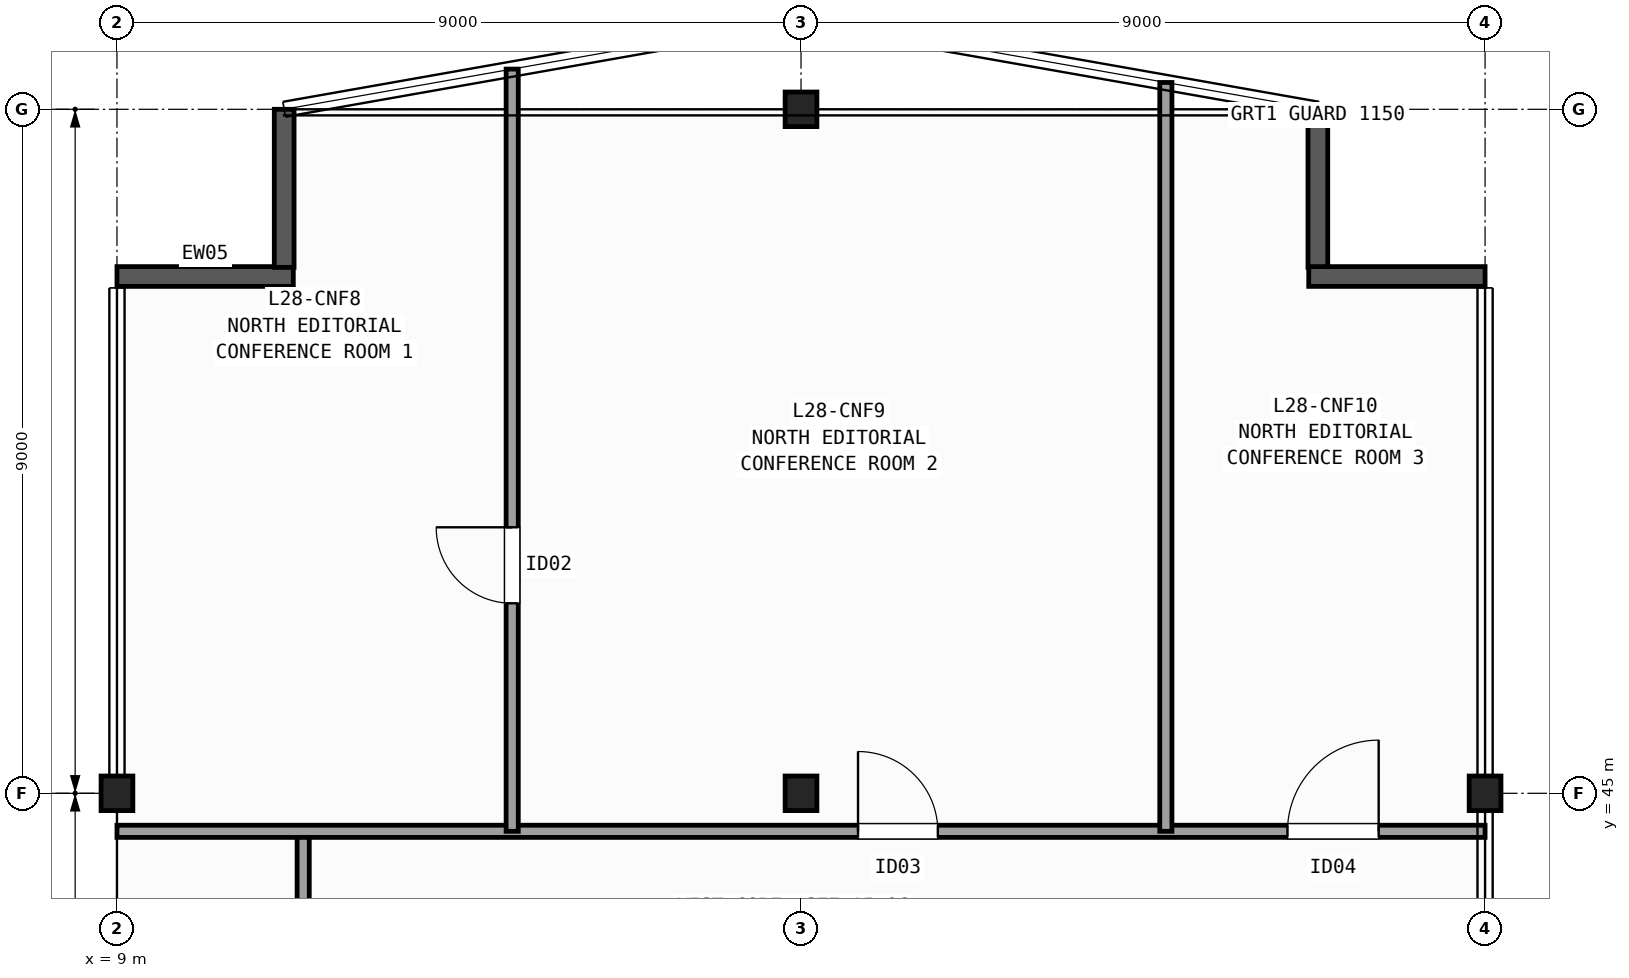
"""IFC4 building model, lengths in metres.
Left out: names, types, materials, properties, quantities, classifications, styles, units other than length and angle.
Written with IfcOpenShell. Run it as: python <this file> out.ifc"""

import sys

from ifc_helpers import new_model, si_unit, direction, frame, frame_2d, origin, origin_2d, place, context, subcontext, project, spatial, rectangle, i_section, extrude, element, fill, save


model = new_model("IFC4")
c1 = context("Model", 3, precision=1e-05, world=origin(), true_north=direction((0.0, 1.0)))
c2 = subcontext(c1, "Body", "Model", "MODEL_VIEW")
j1 = project(units=[si_unit("LENGTHUNIT", "METRE"), si_unit("PLANEANGLEUNIT", "RADIAN")], contexts=[c1])
p1 = place(None, origin())
s1 = spatial("IfcSite", under=j1, at=p1, CompositionType="ELEMENT")
p2 = place(p1, origin())
s2 = spatial("IfcBuilding", under=s1, at=p2, CompositionType="ELEMENT")
p3 = place(p2, frame((0.0, 0.0, 117.4)))
s3 = spatial("IfcBuildingStorey", under=s2, at=p3, CompositionType="ELEMENT", Elevation=117.4)
for number, where, z_axis, x_axis in (
    (1, (9.0, 45.0, 0.0), (0.0, 0.0, 1.0), (1.0, 0.0, 0.0)),
    (2, (18.0, 45.0, 0.0), (0.0, 0.0, 1.0), (1.0, 0.0, 0.0)),
    (3, (18.0, 54.0, 0.0), (0.0, 0.0, 1.0), (1.0, 0.0, 0.0)),
    (4, (27.0, 45.0, 0.0), (0.0, 0.0, 1.0), (1.0, 0.0, 0.0)),
):
    element("IfcColumn", number, at=place(p3, frame(where, z_axis=z_axis, x_axis=x_axis)), inside=s3, PredefinedType="COLUMN", context=c2, shape_type="SweptSolid", body=[
        extrude(i_section(OverallWidth=0.418, OverallDepth=0.455, WebThickness=0.042, FlangeThickness=0.068, FilletRadius=0.015, at=origin_2d()), origin(), (0.0, 0.0, 1.0), 3.7),
    ])
p4 = place(p3, frame((9.0, 51.8, 0.0), z_axis=(0.0, 0.0, 1.0), x_axis=(1.0, 0.0, 0.0)))
e5 = element("IfcWall", 5, at=p4, inside=s3, PredefinedType="SOLIDWALL", context=c2, shape_type="SweptSolid", body=[
    extrude(rectangle(XDim=2.32, YDim=0.26, at=frame_2d((1.16, 0.0))), origin(), (0.0, 0.0, 1.0), 3.42),
])
for number, where, z_axis, x_axis in (
    (6, (11.2, 51.92, 0.0), (0.0, 0.0, 1.0), (0.0, 1.0, 0.0)),
    (7, (24.8, 54.0, 0.0), (0.0, 0.0, 1.0), (0.0, -1.0, 0.0)),
):
    element("IfcWall", number, at=place(p3, frame(where, z_axis=z_axis, x_axis=x_axis)), inside=s3, PredefinedType="SOLIDWALL", context=c2, shape_type="SweptSolid", body=[
        extrude(rectangle(XDim=2.08, YDim=0.26, at=frame_2d((1.04, 0.0))), origin(), (0.0, 0.0, 1.0), 3.42),
    ])
p5 = place(p3, frame((24.68, 51.8, 0.0), z_axis=(0.0, 0.0, 1.0), x_axis=(1.0, 0.0, 0.0)))
e8 = element("IfcWall", 8, at=p5, inside=s3, PredefinedType="SOLIDWALL", context=c2, shape_type="SweptSolid", body=[
    extrude(rectangle(XDim=2.32, YDim=0.26, at=frame_2d((1.16, 0.0))), origin(), (0.0, 0.0, 1.0), 3.42),
])
p6 = place(p3, frame((11.45, 42.4, 0.0), z_axis=(0.0, 0.0, 1.0), x_axis=(0.0, 1.0, 0.0)))
e9 = element("IfcWall", 9, at=p6, inside=s3, PredefinedType="PARTITIONING", context=c2, shape_type="SweptSolid", body=[
    extrude(rectangle(XDim=2.1, YDim=0.16, at=frame_2d((1.05, 0.0))), origin(), (0.0, 0.0, 1.0), 3.42),
])
p7 = place(p3, frame((9.0, 44.5, 0.0), z_axis=(0.0, 0.0, 1.0), x_axis=(1.0, 0.0, 0.0)))
e10 = element("IfcWall", 10, at=p7, inside=s3, PredefinedType="PARTITIONING", context=c2, shape_type="SweptSolid", body=[
    extrude(rectangle(XDim=18.0, YDim=0.16, at=frame_2d((9.0, 0.0))), origin(), (0.0, 0.0, 1.0), 2.634),
])
p8 = place(p7, frame((9.75, 0.0, 0.0)))
e11 = element("IfcOpeningElement", 11, at=p8, cuts=e10, PredefinedType="OPENING", context=c2, shape_type="SweptSolid", body=[
    extrude(rectangle(XDim=1.05, YDim=2.15, at=frame_2d((0.525, 1.075))), frame((0.0, 0.09, 0.0), z_axis=(0.0, -1.0, 0.0), x_axis=(1.0, 0.0, 0.0)), (0.0, 0.0, 1.0), 0.18),
])
p9 = place(p7, frame((15.4, 0.0, 0.0)))
e12 = element("IfcOpeningElement", 12, at=p9, cuts=e10, PredefinedType="OPENING", context=c2, shape_type="SweptSolid", body=[
    extrude(rectangle(XDim=1.2, YDim=2.15, at=frame_2d((0.6, 1.075))), frame((0.0, 0.09, 0.0), z_axis=(0.0, -1.0, 0.0), x_axis=(1.0, 0.0, 0.0)), (0.0, 0.0, 1.0), 0.18),
])
p10 = place(p3, frame((14.2, 44.5, 0.0), z_axis=(0.0, 0.0, 1.0), x_axis=(0.0, 1.0, 0.0)))
e13 = element("IfcWall", 13, at=p10, inside=s3, PredefinedType="PARTITIONING", context=c2, shape_type="SweptSolid", body=[
    extrude(rectangle(XDim=10.029, YDim=0.16, at=frame_2d((5.015, 0.0))), origin(), (0.0, 0.0, 1.0), 3.42),
])
p11 = place(p10, frame((3.0, 0.0, 0.0)))
e14 = element("IfcOpeningElement", 14, at=p11, cuts=e13, PredefinedType="OPENING", context=c2, shape_type="SweptSolid", body=[
    extrude(rectangle(XDim=1.0, YDim=2.1, at=frame_2d((0.5, 1.05))), frame((0.0, 0.09, 0.0), z_axis=(0.0, -1.0, 0.0), x_axis=(1.0, 0.0, 0.0)), (0.0, 0.0, 1.0), 0.18),
])
p12 = place(p3, frame((22.8, 44.5, 0.0), z_axis=(0.0, 0.0, 1.0), x_axis=(0.0, 1.0, 0.0)))
e15 = element("IfcWall", 15, at=p12, inside=s3, PredefinedType="PARTITIONING", context=c2, shape_type="SweptSolid", body=[
    extrude(rectangle(XDim=9.853, YDim=0.16, at=frame_2d((4.927, 0.0))), origin(), (0.0, 0.0, 1.0), 3.42),
])
p13 = place(p11, origin())
e16 = element("IfcDoor", 16, at=p13, inside=s3, OperationType="SINGLE_SWING_RIGHT", PredefinedType="DOOR", context=c2, shape_type="SweptSolid", body=[
    extrude(rectangle(XDim=1.0, YDim=2.1, at=frame_2d((0.5, 1.05))), frame((0.0, 0.025, 0.0), z_axis=(0.0, -1.0, 0.0), x_axis=(1.0, 0.0, 0.0)), (0.0, 0.0, 1.0), 0.05),
])
fill(e14, e16)
p14 = place(p8, origin())
e17 = element("IfcDoor", 17, at=p14, inside=s3, OperationType="SINGLE_SWING_LEFT", PredefinedType="DOOR", context=c2, shape_type="SweptSolid", body=[
    extrude(rectangle(XDim=1.05, YDim=2.15, at=frame_2d((0.525, 1.075))), frame((0.0, 0.025, 0.0), z_axis=(0.0, -1.0, 0.0), x_axis=(1.0, 0.0, 0.0)), (0.0, 0.0, 1.0), 0.05),
])
fill(e11, e17)
p15 = place(p9, origin())
e18 = element("IfcDoor", 18, at=p15, inside=s3, OperationType="SINGLE_SWING_RIGHT", PredefinedType="DOOR", context=c2, shape_type="SweptSolid", body=[
    extrude(rectangle(XDim=1.2, YDim=2.15, at=frame_2d((0.6, 1.075))), frame((0.0, 0.025, 0.0), z_axis=(0.0, -1.0, 0.0), x_axis=(1.0, 0.0, 0.0)), (0.0, 0.0, 1.0), 0.05),
])
fill(e12, e18)
save(model, sys.argv[1])
